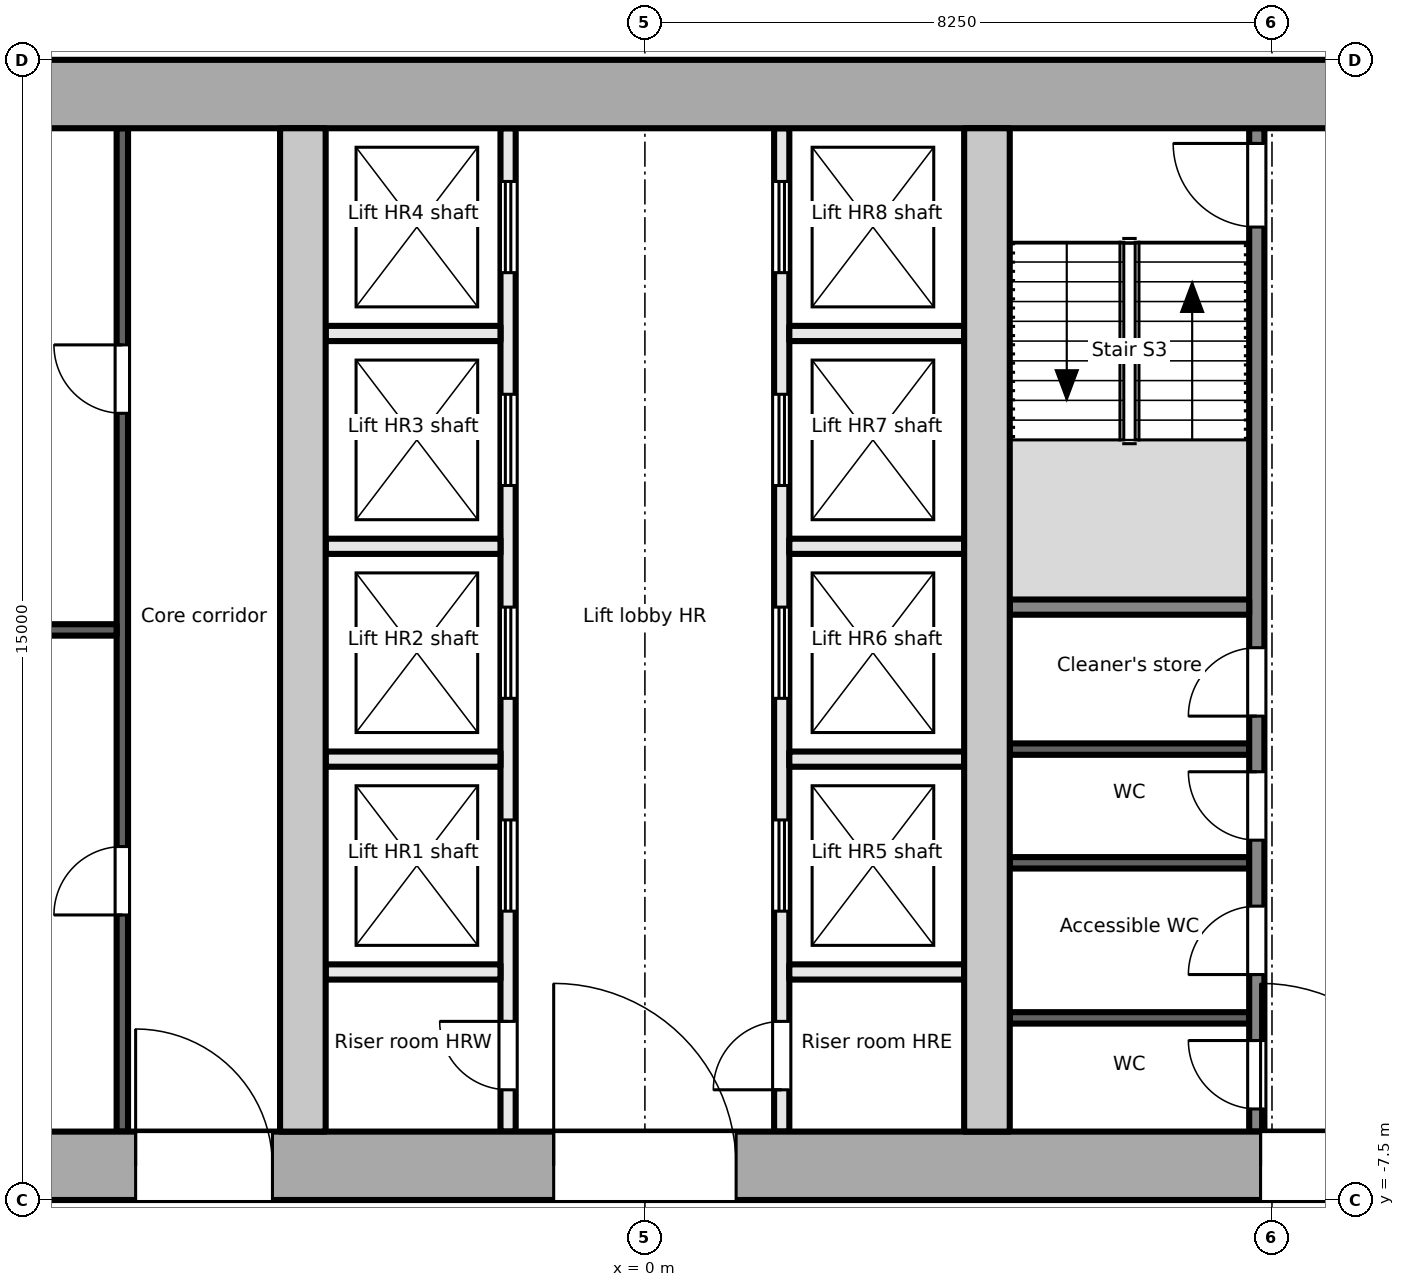
"""IFC4 building model, lengths in metres.
Left out: names, types, materials, properties, quantities, classifications, styles, units other than length and angle.
Written with IfcOpenShell. Run it as: python <this file> out.ifc"""

import sys

from ifc_helpers import new_model, si_unit, direction, frame, frame_2d, origin, place, context, subcontext, project, spatial, rectangle, extrude, element, fill, save


model = new_model("IFC4")
c1 = context("Model", 3, precision=1e-05, world=origin(), true_north=direction((0.0, 1.0)))
c2 = subcontext(c1, "Body", "Model", "MODEL_VIEW")
j1 = project(units=[si_unit("LENGTHUNIT", "METRE"), si_unit("PLANEANGLEUNIT", "RADIAN")], contexts=[c1])
p1 = place(None, origin())
s1 = spatial("IfcSite", under=j1, at=p1, CompositionType="ELEMENT")
p2 = place(p1, origin())
s2 = spatial("IfcBuilding", under=s1, at=p2, CompositionType="ELEMENT")
p3 = place(p2, frame((0.0, 0.0, 266.8)))
s3 = spatial("IfcBuildingStorey", under=s2, at=p3, CompositionType="ELEMENT", Elevation=266.8)
p4 = place(p3, frame((-18.0, -7.05, -0.2), z_axis=(0.0, 0.0, 1.0), x_axis=(1.0, 0.0, 0.0)))
e1 = element("IfcWall", 1, at=p4, inside=s3, PredefinedType="SHEAR", context=c2, shape_type="SweptSolid", body=[
    extrude(rectangle(XDim=36.0, YDim=0.9, at=frame_2d((18.0, 0.0))), origin(), (0.0, 0.0, 1.0), 3.9),
])
p5 = place(p4, frame((11.3, 0.0, 0.2)))
e2 = element("IfcOpeningElement", 2, at=p5, cuts=e1, PredefinedType="OPENING", context=c2, shape_type="SweptSolid", body=[
    extrude(rectangle(XDim=1.8, YDim=2.1, at=frame_2d((0.9, 1.05))), frame((0.0, 0.46, 0.0), z_axis=(0.0, -1.0, 0.0), x_axis=(1.0, 0.0, 0.0)), (0.0, 0.0, 1.0), 0.921),
])
p6 = place(p4, frame((16.8, 0.0, 0.2)))
e3 = element("IfcOpeningElement", 3, at=p6, cuts=e1, PredefinedType="OPENING", context=c2, shape_type="SweptSolid", body=[
    extrude(rectangle(XDim=2.4, YDim=2.1, at=frame_2d((1.2, 1.05))), frame((0.0, 0.46, 0.0), z_axis=(0.0, -1.0, 0.0), x_axis=(1.0, 0.0, 0.0)), (0.0, 0.0, 1.0), 0.921),
])
p7 = place(p4, frame((26.1, 0.0, 0.2)))
e4 = element("IfcOpeningElement", 4, at=p7, cuts=e1, PredefinedType="OPENING", context=c2, shape_type="SweptSolid", body=[
    extrude(rectangle(XDim=2.4, YDim=2.1, at=frame_2d((1.2, 1.05))), frame((0.0, 0.46, 0.0), z_axis=(0.0, -1.0, 0.0), x_axis=(1.0, 0.0, 0.0)), (0.0, 0.0, 1.0), 0.921),
])
p8 = place(p3, frame((-18.0, 7.05, -0.2), z_axis=(0.0, 0.0, 1.0), x_axis=(1.0, 0.0, 0.0)))
e5 = element("IfcWall", 5, at=p8, inside=s3, PredefinedType="SHEAR", context=c2, shape_type="SweptSolid", body=[
    extrude(rectangle(XDim=36.0, YDim=0.9, at=frame_2d((18.0, 0.0))), origin(), (0.0, 0.0, 1.0), 3.9),
])
for number, where, z_axis, x_axis in (
    (6, (-4.5, -6.6, -0.2), (0.0, 0.0, 1.0), (0.0, 1.0, 0.0)),
    (7, (4.5, -6.6, -0.2), (0.0, 0.0, 1.0), (0.0, 1.0, 0.0)),
):
    element("IfcWall", number, at=place(p3, frame(where, z_axis=z_axis, x_axis=x_axis)), inside=s3, PredefinedType="SHEAR", context=c2, shape_type="SweptSolid", body=[
        extrude(rectangle(XDim=13.2, YDim=0.6, at=frame_2d((6.6, 0.0))), origin(), (0.0, 0.0, 1.0), 3.9),
    ])
p9 = place(p3, frame((-6.875, -6.6, 0.0), z_axis=(0.0, 0.0, 1.0), x_axis=(0.0, 1.0, 0.0)))
e8 = element("IfcWall", 8, at=p9, inside=s3, PredefinedType="PARTITIONING", context=c2, shape_type="SweptSolid", body=[
    extrude(rectangle(XDim=13.2, YDim=0.15, at=frame_2d((6.6, 0.0))), origin(), (0.0, 0.0, 1.0), 3.7),
])
p10 = place(p9, frame((2.85, 0.0, 0.0)))
e9 = element("IfcOpeningElement", 9, at=p10, cuts=e8, PredefinedType="OPENING", context=c2, shape_type="SweptSolid", body=[
    extrude(rectangle(XDim=0.9, YDim=2.1, at=frame_2d((0.45, 1.05))), frame((0.0, 0.085, 0.0), z_axis=(0.0, -1.0, 0.0), x_axis=(1.0, 0.0, 0.0)), (0.0, 0.0, 1.0), 0.171),
])
p11 = place(p9, frame((9.45, 0.0, 0.0)))
e10 = element("IfcOpeningElement", 10, at=p11, cuts=e8, PredefinedType="OPENING", context=c2, shape_type="SweptSolid", body=[
    extrude(rectangle(XDim=0.9, YDim=2.1, at=frame_2d((0.45, 1.05))), frame((0.0, 0.085, 0.0), z_axis=(0.0, -1.0, 0.0), x_axis=(1.0, 0.0, 0.0)), (0.0, 0.0, 1.0), 0.171),
])
p12 = place(p3, frame((-13.2, 0.0, 0.0), z_axis=(0.0, 0.0, 1.0), x_axis=(1.0, 0.0, 0.0)))
e11 = element("IfcWall", 11, at=p12, inside=s3, PredefinedType="PARTITIONING", context=c2, shape_type="SweptSolid", body=[
    extrude(rectangle(XDim=6.25, YDim=0.15, at=frame_2d((3.125, 0.0))), origin(), (0.0, 0.0, 1.0), 3.7),
])
p13 = place(p3, frame((-1.8, -6.6, 0.0), z_axis=(0.0, 0.0, 1.0), x_axis=(0.0, 1.0, 0.0)))
e12 = element("IfcWall", 12, at=p13, inside=s3, PredefinedType="PARTITIONING", context=c2, shape_type="SweptSolid", body=[
    extrude(rectangle(XDim=13.2, YDim=0.2, at=frame_2d((6.6, 0.0))), origin(), (0.0, 0.0, 1.0), 3.7),
])
p14 = place(p13, frame((0.55, 0.0, 0.0)))
e13 = element("IfcOpeningElement", 13, at=p14, cuts=e12, PredefinedType="OPENING", context=c2, shape_type="SweptSolid", body=[
    extrude(rectangle(XDim=0.9, YDim=2.1, at=frame_2d((0.45, 1.05))), frame((0.0, 0.111, 0.0), z_axis=(0.0, -1.0, 0.0), x_axis=(1.0, 0.0, 0.0)), (0.0, 0.0, 1.0), 0.221),
])
p15 = place(p13, frame((2.9, 0.0, 0.0)))
e14 = element("IfcOpeningElement", 14, at=p15, cuts=e12, PredefinedType="OPENING", context=c2, shape_type="SweptSolid", body=[
    extrude(rectangle(XDim=1.2, YDim=2.1, at=frame_2d((0.6, 1.05))), frame((0.0, 0.111, 0.0), z_axis=(0.0, -1.0, 0.0), x_axis=(1.0, 0.0, 0.0)), (0.0, 0.0, 1.0), 0.221),
])
p16 = place(p13, frame((5.7, 0.0, 0.0)))
e15 = element("IfcOpeningElement", 15, at=p16, cuts=e12, PredefinedType="OPENING", context=c2, shape_type="SweptSolid", body=[
    extrude(rectangle(XDim=1.2, YDim=2.1, at=frame_2d((0.6, 1.05))), frame((0.0, 0.111, 0.0), z_axis=(0.0, -1.0, 0.0), x_axis=(1.0, 0.0, 0.0)), (0.0, 0.0, 1.0), 0.221),
])
p17 = place(p13, frame((8.5, 0.0, 0.0)))
e16 = element("IfcOpeningElement", 16, at=p17, cuts=e12, PredefinedType="OPENING", context=c2, shape_type="SweptSolid", body=[
    extrude(rectangle(XDim=1.2, YDim=2.1, at=frame_2d((0.6, 1.05))), frame((0.0, 0.111, 0.0), z_axis=(0.0, -1.0, 0.0), x_axis=(1.0, 0.0, 0.0)), (0.0, 0.0, 1.0), 0.221),
])
p18 = place(p13, frame((11.3, 0.0, 0.0)))
e17 = element("IfcOpeningElement", 17, at=p18, cuts=e12, PredefinedType="OPENING", context=c2, shape_type="SweptSolid", body=[
    extrude(rectangle(XDim=1.2, YDim=2.1, at=frame_2d((0.6, 1.05))), frame((0.0, 0.111, 0.0), z_axis=(0.0, -1.0, 0.0), x_axis=(1.0, 0.0, 0.0)), (0.0, 0.0, 1.0), 0.221),
])
p19 = place(p3, frame((1.8, -6.6, 0.0), z_axis=(0.0, 0.0, 1.0), x_axis=(0.0, 1.0, 0.0)))
e18 = element("IfcWall", 18, at=p19, inside=s3, PredefinedType="PARTITIONING", context=c2, shape_type="SweptSolid", body=[
    extrude(rectangle(XDim=13.2, YDim=0.2, at=frame_2d((6.6, 0.0))), origin(), (0.0, 0.0, 1.0), 3.7),
])
p20 = place(p19, frame((0.55, 0.0, 0.0)))
e19 = element("IfcOpeningElement", 19, at=p20, cuts=e18, PredefinedType="OPENING", context=c2, shape_type="SweptSolid", body=[
    extrude(rectangle(XDim=0.9, YDim=2.1, at=frame_2d((0.45, 1.05))), frame((0.0, 0.111, 0.0), z_axis=(0.0, -1.0, 0.0), x_axis=(1.0, 0.0, 0.0)), (0.0, 0.0, 1.0), 0.221),
])
p21 = place(p19, frame((2.9, 0.0, 0.0)))
e20 = element("IfcOpeningElement", 20, at=p21, cuts=e18, PredefinedType="OPENING", context=c2, shape_type="SweptSolid", body=[
    extrude(rectangle(XDim=1.2, YDim=2.1, at=frame_2d((0.6, 1.05))), frame((0.0, 0.111, 0.0), z_axis=(0.0, -1.0, 0.0), x_axis=(1.0, 0.0, 0.0)), (0.0, 0.0, 1.0), 0.221),
])
p22 = place(p19, frame((5.7, 0.0, 0.0)))
e21 = element("IfcOpeningElement", 21, at=p22, cuts=e18, PredefinedType="OPENING", context=c2, shape_type="SweptSolid", body=[
    extrude(rectangle(XDim=1.2, YDim=2.1, at=frame_2d((0.6, 1.05))), frame((0.0, 0.111, 0.0), z_axis=(0.0, -1.0, 0.0), x_axis=(1.0, 0.0, 0.0)), (0.0, 0.0, 1.0), 0.221),
])
p23 = place(p19, frame((8.5, 0.0, 0.0)))
e22 = element("IfcOpeningElement", 22, at=p23, cuts=e18, PredefinedType="OPENING", context=c2, shape_type="SweptSolid", body=[
    extrude(rectangle(XDim=1.2, YDim=2.1, at=frame_2d((0.6, 1.05))), frame((0.0, 0.111, 0.0), z_axis=(0.0, -1.0, 0.0), x_axis=(1.0, 0.0, 0.0)), (0.0, 0.0, 1.0), 0.221),
])
p24 = place(p19, frame((11.3, 0.0, 0.0)))
e23 = element("IfcOpeningElement", 23, at=p24, cuts=e18, PredefinedType="OPENING", context=c2, shape_type="SweptSolid", body=[
    extrude(rectangle(XDim=1.2, YDim=2.1, at=frame_2d((0.6, 1.05))), frame((0.0, 0.111, 0.0), z_axis=(0.0, -1.0, 0.0), x_axis=(1.0, 0.0, 0.0)), (0.0, 0.0, 1.0), 0.221),
])
for number, where, z_axis, x_axis in (
    (24, (-4.2, -1.7, 0.0), (0.0, 0.0, 1.0), (1.0, 0.0, 0.0)),
    (25, (-4.2, 1.1, 0.0), (0.0, 0.0, 1.0), (1.0, 0.0, 0.0)),
    (26, (-4.2, 3.9, 0.0), (0.0, 0.0, 1.0), (1.0, 0.0, 0.0)),
    (27, (-4.2, -4.5, 0.0), (0.0, 0.0, 1.0), (1.0, 0.0, 0.0)),
    (28, (1.9, -1.7, 0.0), (0.0, 0.0, 1.0), (1.0, 0.0, 0.0)),
    (29, (1.9, 1.1, 0.0), (0.0, 0.0, 1.0), (1.0, 0.0, 0.0)),
    (30, (1.9, 3.9, 0.0), (0.0, 0.0, 1.0), (1.0, 0.0, 0.0)),
    (31, (1.9, -4.5, 0.0), (0.0, 0.0, 1.0), (1.0, 0.0, 0.0)),
):
    element("IfcWall", number, at=place(p3, frame(where, z_axis=z_axis, x_axis=x_axis)), inside=s3, PredefinedType="PARTITIONING", context=c2, shape_type="SweptSolid", body=[
        extrude(rectangle(XDim=2.3, YDim=0.2, at=frame_2d((1.15, 0.0))), origin(), (0.0, 0.0, 1.0), 3.7),
    ])
p25 = place(p3, frame((8.05, -6.6, 0.0), z_axis=(0.0, 0.0, 1.0), x_axis=(0.0, 1.0, 0.0)))
e32 = element("IfcWall", 32, at=p25, inside=s3, PredefinedType="PARTITIONING", context=c2, shape_type="SweptSolid", body=[
    extrude(rectangle(XDim=13.2, YDim=0.2, at=frame_2d((6.6, 0.0))), origin(), (0.0, 0.0, 1.0), 3.7),
])
p26 = place(p25, frame((0.298, 0.0, 0.0)))
e33 = element("IfcOpeningElement", 33, at=p26, cuts=e32, PredefinedType="OPENING", context=c2, shape_type="SweptSolid", body=[
    extrude(rectangle(XDim=0.9, YDim=2.1, at=frame_2d((0.45, 1.05))), frame((0.0, 0.111, 0.0), z_axis=(0.0, -1.0, 0.0), x_axis=(1.0, 0.0, 0.0)), (0.0, 0.0, 1.0), 0.221),
])
p27 = place(p25, frame((2.066, 0.0, 0.0)))
e34 = element("IfcOpeningElement", 34, at=p27, cuts=e32, PredefinedType="OPENING", context=c2, shape_type="SweptSolid", body=[
    extrude(rectangle(XDim=0.9, YDim=2.1, at=frame_2d((0.45, 1.05))), frame((0.0, 0.111, 0.0), z_axis=(0.0, -1.0, 0.0), x_axis=(1.0, 0.0, 0.0)), (0.0, 0.0, 1.0), 0.221),
])
p28 = place(p25, frame((3.834, 0.0, 0.0)))
e35 = element("IfcOpeningElement", 35, at=p28, cuts=e32, PredefinedType="OPENING", context=c2, shape_type="SweptSolid", body=[
    extrude(rectangle(XDim=0.9, YDim=2.1, at=frame_2d((0.45, 1.05))), frame((0.0, 0.111, 0.0), z_axis=(0.0, -1.0, 0.0), x_axis=(1.0, 0.0, 0.0)), (0.0, 0.0, 1.0), 0.221),
])
p29 = place(p25, frame((5.466, 0.0, 0.0)))
e36 = element("IfcOpeningElement", 36, at=p29, cuts=e32, PredefinedType="OPENING", context=c2, shape_type="SweptSolid", body=[
    extrude(rectangle(XDim=0.9, YDim=2.1, at=frame_2d((0.45, 1.05))), frame((0.0, 0.111, 0.0), z_axis=(0.0, -1.0, 0.0), x_axis=(1.0, 0.0, 0.0)), (0.0, 0.0, 1.0), 0.221),
])
p30 = place(p25, frame((11.9, 0.0, 0.0)))
e37 = element("IfcOpeningElement", 37, at=p30, cuts=e32, PredefinedType="OPENING", context=c2, shape_type="SweptSolid", body=[
    extrude(rectangle(XDim=1.1, YDim=2.1, at=frame_2d((0.55, 1.05))), frame((0.0, 0.111, 0.0), z_axis=(0.0, -1.0, 0.0), x_axis=(1.0, 0.0, 0.0)), (0.0, 0.0, 1.0), 0.221),
])
p31 = place(p3, frame((4.8, 0.3, 0.0), z_axis=(0.0, 0.0, 1.0), x_axis=(1.0, 0.0, 0.0)))
e38 = element("IfcWall", 38, at=p31, inside=s3, PredefinedType="PARTITIONING", context=c2, shape_type="SweptSolid", body=[
    extrude(rectangle(XDim=3.15, YDim=0.2, at=frame_2d((1.575, 0.0))), origin(), (0.0, 0.0, 1.0), 3.7),
])
for number, where, z_axis, x_axis in (
    (39, (4.8, -5.104, 0.0), (0.0, 0.0, 1.0), (1.0, 0.0, 0.0)),
    (40, (4.8, -3.064, 0.0), (0.0, 0.0, 1.0), (1.0, 0.0, 0.0)),
    (41, (4.8, -1.568, 0.0), (0.0, 0.0, 1.0), (1.0, 0.0, 0.0)),
):
    element("IfcWall", number, at=place(p3, frame(where, z_axis=z_axis, x_axis=x_axis)), inside=s3, PredefinedType="PARTITIONING", context=c2, shape_type="SweptSolid", body=[
        extrude(rectangle(XDim=3.15, YDim=0.15, at=frame_2d((1.575, 0.0))), origin(), (0.0, 0.0, 1.0), 3.7),
    ])
p32 = place(p10, origin())
e42 = element("IfcDoor", 42, at=p32, inside=s3, OperationType="SINGLE_SWING_LEFT", PredefinedType="DOOR", context=c2, shape_type="SweptSolid", body=[
    extrude(rectangle(XDim=0.9, YDim=2.1, at=frame_2d((0.45, 1.05))), frame((0.0, 0.025, 0.0), z_axis=(0.0, -1.0, 0.0), x_axis=(1.0, 0.0, 0.0)), (0.0, 0.0, 1.0), 0.05),
])
fill(e9, e42)
p33 = place(p11, origin())
e43 = element("IfcDoor", 43, at=p33, inside=s3, OperationType="SINGLE_SWING_RIGHT", PredefinedType="DOOR", context=c2, shape_type="SweptSolid", body=[
    extrude(rectangle(XDim=0.9, YDim=2.1, at=frame_2d((0.45, 1.05))), frame((0.0, 0.025, 0.0), z_axis=(0.0, -1.0, 0.0), x_axis=(1.0, 0.0, 0.0)), (0.0, 0.0, 1.0), 0.05),
])
fill(e10, e43)
p34 = place(p5, origin())
e44 = element("IfcDoor", 44, at=p34, inside=s3, OperationType="SINGLE_SWING_LEFT", PredefinedType="DOOR", context=c2, shape_type="SweptSolid", body=[
    extrude(rectangle(XDim=1.8, YDim=2.1, at=frame_2d((0.9, 1.05))), frame((0.0, 0.025, 0.0), z_axis=(0.0, -1.0, 0.0), x_axis=(1.0, 0.0, 0.0)), (0.0, 0.0, 1.0), 0.05),
])
fill(e2, e44)
p35 = place(p14, origin())
e45 = element("IfcDoor", 45, at=p35, inside=s3, OperationType="SINGLE_SWING_RIGHT", PredefinedType="DOOR", context=c2, shape_type="SweptSolid", body=[
    extrude(rectangle(XDim=0.9, YDim=2.1, at=frame_2d((0.45, 1.05))), frame((0.0, 0.025, 0.0), z_axis=(0.0, -1.0, 0.0), x_axis=(1.0, 0.0, 0.0)), (0.0, 0.0, 1.0), 0.05),
])
fill(e13, e45)
p36 = place(p15, origin())
e46 = element("IfcDoor", 46, at=p36, inside=s3, OperationType="DOUBLE_DOOR_SLIDING", PredefinedType="DOOR", context=c2, shape_type="SweptSolid", body=[
    extrude(rectangle(XDim=1.2, YDim=2.1, at=frame_2d((0.6, 1.05))), frame((0.0, 0.025, 0.0), z_axis=(0.0, -1.0, 0.0), x_axis=(1.0, 0.0, 0.0)), (0.0, 0.0, 1.0), 0.05),
])
fill(e14, e46)
p37 = place(p16, origin())
e47 = element("IfcDoor", 47, at=p37, inside=s3, OperationType="DOUBLE_DOOR_SLIDING", PredefinedType="DOOR", context=c2, shape_type="SweptSolid", body=[
    extrude(rectangle(XDim=1.2, YDim=2.1, at=frame_2d((0.6, 1.05))), frame((0.0, 0.025, 0.0), z_axis=(0.0, -1.0, 0.0), x_axis=(1.0, 0.0, 0.0)), (0.0, 0.0, 1.0), 0.05),
])
fill(e15, e47)
p38 = place(p17, origin())
e48 = element("IfcDoor", 48, at=p38, inside=s3, OperationType="DOUBLE_DOOR_SLIDING", PredefinedType="DOOR", context=c2, shape_type="SweptSolid", body=[
    extrude(rectangle(XDim=1.2, YDim=2.1, at=frame_2d((0.6, 1.05))), frame((0.0, 0.025, 0.0), z_axis=(0.0, -1.0, 0.0), x_axis=(1.0, 0.0, 0.0)), (0.0, 0.0, 1.0), 0.05),
])
fill(e16, e48)
p39 = place(p18, origin())
e49 = element("IfcDoor", 49, at=p39, inside=s3, OperationType="DOUBLE_DOOR_SLIDING", PredefinedType="DOOR", context=c2, shape_type="SweptSolid", body=[
    extrude(rectangle(XDim=1.2, YDim=2.1, at=frame_2d((0.6, 1.05))), frame((0.0, 0.025, 0.0), z_axis=(0.0, -1.0, 0.0), x_axis=(1.0, 0.0, 0.0)), (0.0, 0.0, 1.0), 0.05),
])
fill(e17, e49)
p40 = place(p20, origin())
e50 = element("IfcDoor", 50, at=p40, inside=s3, OperationType="SINGLE_SWING_LEFT", PredefinedType="DOOR", context=c2, shape_type="SweptSolid", body=[
    extrude(rectangle(XDim=0.9, YDim=2.1, at=frame_2d((0.45, 1.05))), frame((0.0, 0.025, 0.0), z_axis=(0.0, -1.0, 0.0), x_axis=(1.0, 0.0, 0.0)), (0.0, 0.0, 1.0), 0.05),
])
fill(e19, e50)
p41 = place(p21, origin())
e51 = element("IfcDoor", 51, at=p41, inside=s3, OperationType="DOUBLE_DOOR_SLIDING", PredefinedType="DOOR", context=c2, shape_type="SweptSolid", body=[
    extrude(rectangle(XDim=1.2, YDim=2.1, at=frame_2d((0.6, 1.05))), frame((0.0, 0.025, 0.0), z_axis=(0.0, -1.0, 0.0), x_axis=(1.0, 0.0, 0.0)), (0.0, 0.0, 1.0), 0.05),
])
fill(e20, e51)
p42 = place(p22, origin())
e52 = element("IfcDoor", 52, at=p42, inside=s3, OperationType="DOUBLE_DOOR_SLIDING", PredefinedType="DOOR", context=c2, shape_type="SweptSolid", body=[
    extrude(rectangle(XDim=1.2, YDim=2.1, at=frame_2d((0.6, 1.05))), frame((0.0, 0.025, 0.0), z_axis=(0.0, -1.0, 0.0), x_axis=(1.0, 0.0, 0.0)), (0.0, 0.0, 1.0), 0.05),
])
fill(e21, e52)
p43 = place(p23, origin())
e53 = element("IfcDoor", 53, at=p43, inside=s3, OperationType="DOUBLE_DOOR_SLIDING", PredefinedType="DOOR", context=c2, shape_type="SweptSolid", body=[
    extrude(rectangle(XDim=1.2, YDim=2.1, at=frame_2d((0.6, 1.05))), frame((0.0, 0.025, 0.0), z_axis=(0.0, -1.0, 0.0), x_axis=(1.0, 0.0, 0.0)), (0.0, 0.0, 1.0), 0.05),
])
fill(e22, e53)
p44 = place(p24, origin())
e54 = element("IfcDoor", 54, at=p44, inside=s3, OperationType="DOUBLE_DOOR_SLIDING", PredefinedType="DOOR", context=c2, shape_type="SweptSolid", body=[
    extrude(rectangle(XDim=1.2, YDim=2.1, at=frame_2d((0.6, 1.05))), frame((0.0, 0.025, 0.0), z_axis=(0.0, -1.0, 0.0), x_axis=(1.0, 0.0, 0.0)), (0.0, 0.0, 1.0), 0.05),
])
fill(e23, e54)
p45 = place(p6, origin())
e55 = element("IfcDoor", 55, at=p45, inside=s3, OperationType="DOUBLE_DOOR_DOUBLE_SWING", PredefinedType="DOOR", context=c2, shape_type="SweptSolid", body=[
    extrude(rectangle(XDim=2.4, YDim=2.1, at=frame_2d((1.2, 1.05))), frame((0.0, 0.025, 0.0), z_axis=(0.0, -1.0, 0.0), x_axis=(1.0, 0.0, 0.0)), (0.0, 0.0, 1.0), 0.05),
])
fill(e3, e55)
p46 = place(p26, origin())
e56 = element("IfcDoor", 56, at=p46, inside=s3, OperationType="SINGLE_SWING_RIGHT", PredefinedType="DOOR", context=c2, shape_type="SweptSolid", body=[
    extrude(rectangle(XDim=0.9, YDim=2.1, at=frame_2d((0.45, 1.05))), frame((0.0, 0.025, 0.0), z_axis=(0.0, -1.0, 0.0), x_axis=(1.0, 0.0, 0.0)), (0.0, 0.0, 1.0), 0.05),
])
fill(e33, e56)
p47 = place(p27, origin())
e57 = element("IfcDoor", 57, at=p47, inside=s3, OperationType="SINGLE_SWING_LEFT", PredefinedType="DOOR", context=c2, shape_type="SweptSolid", body=[
    extrude(rectangle(XDim=0.9, YDim=2.1, at=frame_2d((0.45, 1.05))), frame((0.0, 0.025, 0.0), z_axis=(0.0, -1.0, 0.0), x_axis=(1.0, 0.0, 0.0)), (0.0, 0.0, 1.0), 0.05),
])
fill(e34, e57)
p48 = place(p28, origin())
e58 = element("IfcDoor", 58, at=p48, inside=s3, OperationType="SINGLE_SWING_RIGHT", PredefinedType="DOOR", context=c2, shape_type="SweptSolid", body=[
    extrude(rectangle(XDim=0.9, YDim=2.1, at=frame_2d((0.45, 1.05))), frame((0.0, 0.025, 0.0), z_axis=(0.0, -1.0, 0.0), x_axis=(1.0, 0.0, 0.0)), (0.0, 0.0, 1.0), 0.05),
])
fill(e35, e58)
p49 = place(p29, origin())
e59 = element("IfcDoor", 59, at=p49, inside=s3, OperationType="SINGLE_SWING_LEFT", PredefinedType="DOOR", context=c2, shape_type="SweptSolid", body=[
    extrude(rectangle(XDim=0.9, YDim=2.1, at=frame_2d((0.45, 1.05))), frame((0.0, 0.025, 0.0), z_axis=(0.0, -1.0, 0.0), x_axis=(1.0, 0.0, 0.0)), (0.0, 0.0, 1.0), 0.05),
])
fill(e36, e59)
p50 = place(p30, origin())
e60 = element("IfcDoor", 60, at=p50, inside=s3, OperationType="SINGLE_SWING_RIGHT", PredefinedType="DOOR", context=c2, shape_type="SweptSolid", body=[
    extrude(rectangle(XDim=1.1, YDim=2.1, at=frame_2d((0.55, 1.05))), frame((0.0, 0.025, 0.0), z_axis=(0.0, -1.0, 0.0), x_axis=(1.0, 0.0, 0.0)), (0.0, 0.0, 1.0), 0.05),
])
fill(e37, e60)
p51 = place(p7, origin())
e61 = element("IfcDoor", 61, at=p51, inside=s3, OperationType="DOUBLE_DOOR_DOUBLE_SWING", PredefinedType="DOOR", context=c2, shape_type="SweptSolid", body=[
    extrude(rectangle(XDim=2.4, YDim=2.1, at=frame_2d((1.2, 1.05))), frame((0.0, 0.025, 0.0), z_axis=(0.0, -1.0, 0.0), x_axis=(1.0, 0.0, 0.0)), (0.0, 0.0, 1.0), 0.05),
])
fill(e4, e61)
save(model, sys.argv[1])
